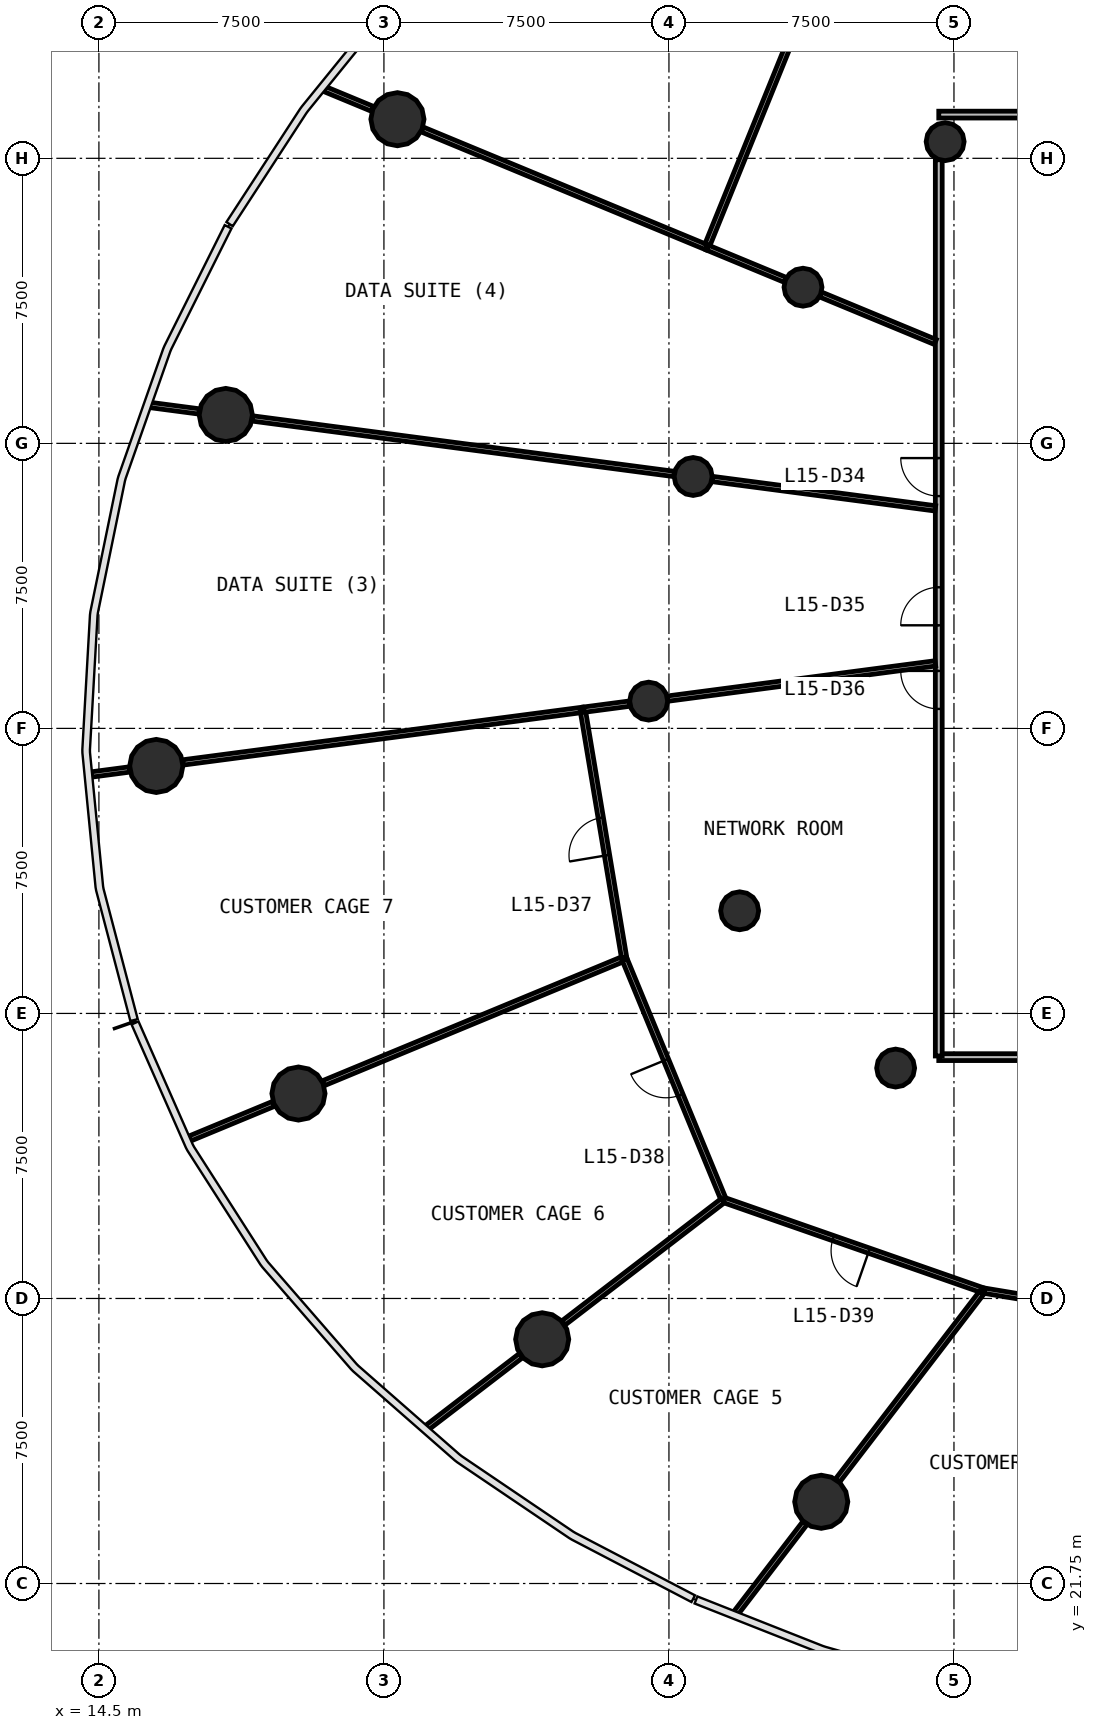
"""IFC4 building model, lengths in metres.
Left out: names, types, materials, properties, quantities, classifications, styles, units other than length and angle.
Written with IfcOpenShell. Run it as: python <this file> out.ifc"""

import sys

from ifc_helpers import new_model, si_unit, direction, frame, frame_2d, origin, origin_2d, place, context, subcontext, project, spatial, rectangle, circle, extrude, source, transform, mapped, element, fill, save


model = new_model("IFC4")
c1 = context("Model", 3, precision=1e-05, world=origin(), true_north=direction((0.0, 1.0)))
c2 = subcontext(c1, "Body", "Model", "MODEL_VIEW")
j1 = project(units=[si_unit("LENGTHUNIT", "METRE"), si_unit("PLANEANGLEUNIT", "RADIAN")], contexts=[c1])
p1 = place(None, origin())
s1 = spatial("IfcSite", under=j1, at=p1, CompositionType="ELEMENT")
p2 = place(p1, origin())
s2 = spatial("IfcBuilding", under=s1, at=p2, CompositionType="ELEMENT")
p3 = place(p2, frame((0.0, 0.0, 66.6)))
s3 = spatial("IfcBuildingStorey", under=s2, at=p3, CompositionType="ELEMENT", Elevation=66.6)
m1 = source(origin(), c2, "Body", "SweptSolid", [
    extrude(circle(Radius=0.7, at=origin_2d()), origin(), (0.0, 0.0, 1.0), 4.4),
])
for number, where, z_axis, x_axis in (
    (1, (22.355, 60.279, 0.0), (0.0, 0.0, 1.0), (1.0, 0.0, 0.0)),
    (2, (17.839, 52.497, 0.0), (0.0, 0.0, 1.0), (1.0, 0.0, 0.0)),
    (3, (16.01, 43.262, 0.0), (0.0, 0.0, 1.0), (1.0, 0.0, 0.0)),
    (4, (19.751, 34.642, 0.0), (0.0, 0.0, 1.0), (1.0, 0.0, 0.0)),
    (5, (26.164, 28.176, 0.0), (0.0, 0.0, 1.0), (1.0, 0.0, 0.0)),
    (6, (33.508, 23.9, 0.0), (0.0, 0.0, 1.0), (1.0, 0.0, 0.0)),
):
    element("IfcColumn", number, at=place(p3, frame(where, z_axis=z_axis, x_axis=x_axis)), inside=s3, PredefinedType="COLUMN", context=c2, shape_type="MappedRepresentation", body=[
        mapped(m1, transform((0.0, 0.0, 0.0), scale=1.0)),
    ])
m2 = source(origin(), c2, "Body", "SweptSolid", [
    extrude(circle(Radius=0.5, at=origin_2d()), origin(), (0.0, 0.0, 1.0), 4.4),
])
for number, where, z_axis, x_axis in (
    (7, (36.768, 59.688, 0.0), (0.0, 0.0, 1.0), (1.0, 0.0, 0.0)),
    (8, (33.028, 55.859, 0.0), (0.0, 0.0, 1.0), (1.0, 0.0, 0.0)),
    (9, (30.137, 50.878, 0.0), (0.0, 0.0, 1.0), (1.0, 0.0, 0.0)),
    (10, (28.966, 44.968, 0.0), (0.0, 0.0, 1.0), (1.0, 0.0, 0.0)),
    (11, (31.361, 39.451, 0.0), (0.0, 0.0, 1.0), (1.0, 0.0, 0.0)),
    (12, (35.465, 35.312, 0.0), (0.0, 0.0, 1.0), (1.0, 0.0, 0.0)),
):
    element("IfcColumn", number, at=place(p3, frame(where, z_axis=z_axis, x_axis=x_axis)), inside=s3, PredefinedType="COLUMN", context=c2, shape_type="MappedRepresentation", body=[
        mapped(m2, transform((0.0, 0.0, 0.0), scale=1.0)),
    ])
p4 = place(p3, frame((67.4, 35.6, 0.0), z_axis=(0.0, 0.0, 1.0), x_axis=(-1.0, 0.0, 0.0)))
e13 = element("IfcWall", 13, at=p4, inside=s3, PredefinedType="PARTITIONING", context=c2, shape_type="SweptSolid", body=[
    extrude(rectangle(XDim=30.8, YDim=0.18, at=frame_2d((15.4, 0.0))), origin(), (0.0, 0.0, 1.0), 3.05),
])
p5 = place(p4, frame((9.05, 0.0, 0.0)))
e14 = element("IfcOpeningElement", 14, at=p5, cuts=e13, PredefinedType="OPENING", context=c2, shape_type="SweptSolid", body=[
    extrude(rectangle(XDim=0.9, YDim=2.1, at=frame_2d((0.45, 1.05))), frame((0.0, 0.1, 0.0), z_axis=(0.0, -1.0, 0.0), x_axis=(1.0, 0.0, 0.0)), (0.0, 0.0, 1.0), 0.2),
])
p6 = place(p4, frame((6.05, 0.0, 0.0)))
e15 = element("IfcOpeningElement", 15, at=p6, cuts=e13, PredefinedType="OPENING", context=c2, shape_type="SweptSolid", body=[
    extrude(rectangle(XDim=0.9, YDim=2.1, at=frame_2d((0.45, 1.05))), frame((0.0, 0.1, 0.0), z_axis=(0.0, -1.0, 0.0), x_axis=(1.0, 0.0, 0.0)), (0.0, 0.0, 1.0), 0.2),
])
p7 = place(p4, frame((2.45, 0.0, 0.0)))
e16 = element("IfcOpeningElement", 16, at=p7, cuts=e13, PredefinedType="OPENING", context=c2, shape_type="SweptSolid", body=[
    extrude(rectangle(XDim=0.9, YDim=2.1, at=frame_2d((0.45, 1.05))), frame((0.0, 0.1, 0.0), z_axis=(0.0, -1.0, 0.0), x_axis=(1.0, 0.0, 0.0)), (0.0, 0.0, 1.0), 0.2),
])
p8 = place(p4, frame((14.95, 0.0, 0.0)))
e17 = element("IfcOpeningElement", 17, at=p8, cuts=e13, PredefinedType="OPENING", context=c2, shape_type="SweptSolid", body=[
    extrude(rectangle(XDim=1.0, YDim=2.1, at=frame_2d((0.5, 1.05))), frame((0.0, 0.1, 0.0), z_axis=(0.0, -1.0, 0.0), x_axis=(1.0, 0.0, 0.0)), (0.0, 0.0, 1.0), 0.2),
])
p9 = place(p3, frame((36.6, 60.4, 0.0), z_axis=(0.0, 0.0, 1.0), x_axis=(1.0, 0.0, 0.0)))
e18 = element("IfcWall", 18, at=p9, inside=s3, PredefinedType="PARTITIONING", context=c2, shape_type="SweptSolid", body=[
    extrude(rectangle(XDim=30.8, YDim=0.18, at=frame_2d((15.4, 0.0))), origin(), (0.0, 0.0, 1.0), 3.05),
])
p10 = place(p9, frame((17.35, 0.0, 0.0)))
e19 = element("IfcOpeningElement", 19, at=p10, cuts=e18, PredefinedType="OPENING", context=c2, shape_type="SweptSolid", body=[
    extrude(rectangle(XDim=1.0, YDim=2.1, at=frame_2d((0.5, 1.05))), frame((0.0, 0.1, 0.0), z_axis=(0.0, -1.0, 0.0), x_axis=(1.0, 0.0, 0.0)), (0.0, 0.0, 1.0), 0.2),
])
p11 = place(p9, frame((14.95, 0.0, 0.0)))
e20 = element("IfcOpeningElement", 20, at=p11, cuts=e18, PredefinedType="OPENING", context=c2, shape_type="SweptSolid", body=[
    extrude(rectangle(XDim=1.0, YDim=2.1, at=frame_2d((0.5, 1.05))), frame((0.0, 0.1, 0.0), z_axis=(0.0, -1.0, 0.0), x_axis=(1.0, 0.0, 0.0)), (0.0, 0.0, 1.0), 0.2),
])
p12 = place(p9, frame((8.95, 0.0, 0.0)))
e21 = element("IfcOpeningElement", 21, at=p12, cuts=e18, PredefinedType="OPENING", context=c2, shape_type="SweptSolid", body=[
    extrude(rectangle(XDim=1.0, YDim=2.1, at=frame_2d((0.5, 1.05))), frame((0.0, 0.1, 0.0), z_axis=(0.0, -1.0, 0.0), x_axis=(1.0, 0.0, 0.0)), (0.0, 0.0, 1.0), 0.2),
])
p13 = place(p3, frame((36.6, 35.63, 0.0), z_axis=(0.0, 0.0, 1.0), x_axis=(0.0, 1.0, 0.0)))
e22 = element("IfcWall", 22, at=p13, inside=s3, PredefinedType="PARTITIONING", context=c2, shape_type="SweptSolid", body=[
    extrude(rectangle(XDim=23.583, YDim=0.18, at=frame_2d((11.791, 0.0))), origin(), (0.0, 0.0, 1.0), 3.05),
])
p14 = place(p13, frame((14.732, 0.0, 0.0)))
e23 = element("IfcOpeningElement", 23, at=p14, cuts=e22, PredefinedType="OPENING", context=c2, shape_type="SweptSolid", body=[
    extrude(rectangle(XDim=1.0, YDim=2.1, at=frame_2d((0.5, 1.05))), frame((0.0, 0.1, 0.0), z_axis=(0.0, -1.0, 0.0), x_axis=(1.0, 0.0, 0.0)), (0.0, 0.0, 1.0), 0.2),
])
p15 = place(p13, frame((11.333, 0.0, 0.0)))
e24 = element("IfcOpeningElement", 24, at=p15, cuts=e22, PredefinedType="OPENING", context=c2, shape_type="SweptSolid", body=[
    extrude(rectangle(XDim=1.0, YDim=2.1, at=frame_2d((0.5, 1.05))), frame((0.0, 0.1, 0.0), z_axis=(0.0, -1.0, 0.0), x_axis=(1.0, 0.0, 0.0)), (0.0, 0.0, 1.0), 0.2),
])
p16 = place(p13, frame((9.133, 0.0, 0.0)))
e25 = element("IfcOpeningElement", 25, at=p16, cuts=e22, PredefinedType="OPENING", context=c2, shape_type="SweptSolid", body=[
    extrude(rectangle(XDim=1.0, YDim=2.1, at=frame_2d((0.5, 1.05))), frame((0.0, 0.1, 0.0), z_axis=(0.0, -1.0, 0.0), x_axis=(1.0, 0.0, 0.0)), (0.0, 0.0, 1.0), 0.2),
])
p17 = place(p3, frame((29.637, 50.944, 0.0), z_axis=(0.0, 0.0, 1.0), x_axis=(-0.991443306772, 0.130538000051, 0.0)))
e26 = element("IfcWall", 26, at=p17, inside=s3, PredefinedType="PARTITIONING", context=c2, shape_type="SweptSolid", body=[
    extrude(rectangle(XDim=11.195, YDim=0.14, at=frame_2d((5.598, 0.0))), origin(), (0.0, 0.0, 1.0), 3.05),
])
p18 = place(p3, frame((27.231, 44.739, 0.0), z_axis=(0.0, 0.0, 1.0), x_axis=(-0.991446699666, -0.130512228242, 0.0)))
e27 = element("IfcWall", 27, at=p18, inside=s3, PredefinedType="PARTITIONING", context=c2, shape_type="SweptSolid", body=[
    extrude(rectangle(XDim=10.614, YDim=0.14, at=frame_2d((5.307, 0.0))), origin(), (0.0, 0.0, 1.0), 3.05),
])
p19 = place(p3, frame((28.324, 38.193, 0.0), z_axis=(0.0, 0.0, 1.0), x_axis=(-0.923883575944, -0.382673670509, 0.0)))
e28 = element("IfcWall", 28, at=p19, inside=s3, PredefinedType="PARTITIONING", context=c2, shape_type="SweptSolid", body=[
    extrude(rectangle(XDim=8.574, YDim=0.14, at=frame_2d((4.287, 0.0))), origin(), (0.0, 0.0, 1.0), 3.05),
])
p20 = place(p3, frame((30.487, 56.911, 0.0), z_axis=(0.0, 0.0, 1.0), x_axis=(-0.923876068888, 0.382691794185, 0.0)))
e29 = element("IfcWall", 29, at=p20, inside=s3, PredefinedType="PARTITIONING", context=c2, shape_type="SweptSolid", body=[
    extrude(rectangle(XDim=8.096, YDim=0.14, at=frame_2d((4.048, 0.0))), origin(), (0.0, 0.0, 1.0), 3.05),
])
p21 = place(p3, frame((37.773, 29.459, 0.0), z_axis=(0.0, 0.0, 1.0), x_axis=(-0.944197740639, 0.329379153215, 0.0)))
e30 = element("IfcWall", 30, at=p21, inside=s3, PredefinedType="PARTITIONING", context=c2, shape_type="SweptSolid", body=[
    extrude(rectangle(XDim=7.234, YDim=0.14, at=frame_2d((3.617, 0.0))), origin(), (0.0, 0.0, 1.0), 3.05),
])
p22 = place(p21, frame((3.184, 0.0, 0.0)))
e31 = element("IfcOpeningElement", 31, at=p22, cuts=e30, PredefinedType="OPENING", context=c2, shape_type="SweptSolid", body=[
    extrude(rectangle(XDim=1.0, YDim=2.1, at=frame_2d((0.5, 1.05))), frame((0.0, 0.08, 0.0), z_axis=(0.0, -1.0, 0.0), x_axis=(1.0, 0.0, 0.0)), (0.0, 0.0, 1.0), 0.16),
])
p23 = place(p3, frame((36.51, 45.961, 0.0), z_axis=(0.0, 0.0, 1.0), x_axis=(-0.99144622305, -0.130515848849, 0.0)))
e32 = element("IfcWall", 32, at=p23, inside=s3, PredefinedType="PARTITIONING", context=c2, shape_type="SweptSolid", body=[
    extrude(rectangle(XDim=7.104, YDim=0.14, at=frame_2d((3.552, 0.0))), origin(), (0.0, 0.0, 1.0), 3.05),
])
p24 = place(p3, frame((30.931, 31.87, 0.0), z_axis=(0.0, 0.0, 1.0), x_axis=(-0.38111222583, 0.924528783393, 0.0)))
e33 = element("IfcWall", 33, at=p24, inside=s3, PredefinedType="PARTITIONING", context=c2, shape_type="SweptSolid", body=[
    extrude(rectangle(XDim=6.81, YDim=0.14, at=frame_2d((3.405, 0.0))), origin(), (0.0, 0.0, 1.0), 3.05),
])
p25 = place(p24, frame((2.96, 0.0, 0.0)))
e34 = element("IfcOpeningElement", 34, at=p25, cuts=e33, PredefinedType="OPENING", context=c2, shape_type="SweptSolid", body=[
    extrude(rectangle(XDim=1.0, YDim=2.1, at=frame_2d((0.5, 1.05))), frame((0.0, 0.08, 0.0), z_axis=(0.0, -1.0, 0.0), x_axis=(1.0, 0.0, 0.0)), (0.0, 0.0, 1.0), 0.16),
])
p26 = place(p3, frame((28.319, 38.223, 0.0), z_axis=(0.0, 0.0, 1.0), x_axis=(-0.164712011009, 0.986341702165, 0.0)))
e35 = element("IfcWall", 35, at=p26, inside=s3, PredefinedType="PARTITIONING", context=c2, shape_type="SweptSolid", body=[
    extrude(rectangle(XDim=6.577, YDim=0.14, at=frame_2d((3.288, 0.0))), origin(), (0.0, 0.0, 1.0), 3.05),
])
p27 = place(p26, frame((2.727, 0.0, 0.0)))
e36 = element("IfcOpeningElement", 36, at=p27, cuts=e35, PredefinedType="OPENING", context=c2, shape_type="SweptSolid", body=[
    extrude(rectangle(XDim=1.0, YDim=2.1, at=frame_2d((0.5, 1.05))), frame((0.0, 0.08, 0.0), z_axis=(0.0, -1.0, 0.0), x_axis=(1.0, 0.0, 0.0)), (0.0, 0.0, 1.0), 0.16),
])
p28 = place(p3, frame((37.728, 29.4, 0.0), z_axis=(0.0, 0.0, 1.0), x_axis=(-0.608768873777, -0.793347627664, 0.0)))
e37 = element("IfcWall", 37, at=p28, inside=s3, PredefinedType="PARTITIONING", context=c2, shape_type="SweptSolid", body=[
    extrude(rectangle(XDim=6.229, YDim=0.14, at=frame_2d((3.114, 0.0))), origin(), (0.0, 0.0, 1.0), 3.05),
])
p29 = place(p3, frame((32.825, 62.677, 0.0), z_axis=(0.0, 0.0, 1.0), x_axis=(-0.375902233723, -0.926659328277, 0.0)))
e38 = element("IfcWall", 38, at=p29, inside=s3, PredefinedType="PARTITIONING", context=c2, shape_type="SweptSolid", body=[
    extrude(rectangle(XDim=6.152, YDim=0.14, at=frame_2d((3.076, 0.0))), origin(), (0.0, 0.0, 1.0), 3.05),
])
p30 = place(p3, frame((43.828, 28.454, 0.0), z_axis=(0.0, 0.0, 1.0), x_axis=(-0.986499590072, 0.163763728546, 0.0)))
e39 = element("IfcWall", 39, at=p30, inside=s3, PredefinedType="PARTITIONING", context=c2, shape_type="SweptSolid", body=[
    extrude(rectangle(XDim=6.108, YDim=0.14, at=frame_2d((3.054, 0.0))), origin(), (0.0, 0.0, 1.0), 3.05),
])
p31 = place(p30, frame((2.458, 0.0, 0.0)))
e40 = element("IfcOpeningElement", 40, at=p31, cuts=e39, PredefinedType="OPENING", context=c2, shape_type="SweptSolid", body=[
    extrude(rectangle(XDim=1.0, YDim=2.1, at=frame_2d((0.5, 1.05))), frame((0.0, 0.08, 0.0), z_axis=(0.0, -1.0, 0.0), x_axis=(1.0, 0.0, 0.0)), (0.0, 0.0, 1.0), 0.16),
])
p32 = place(p3, frame((36.51, 50.039, 0.0), z_axis=(0.0, 0.0, 1.0), x_axis=(-0.991445034615, 0.130524876315, 0.0)))
e41 = element("IfcWall", 41, at=p32, inside=s3, PredefinedType="PARTITIONING", context=c2, shape_type="SweptSolid", body=[
    extrude(rectangle(XDim=5.924, YDim=0.14, at=frame_2d((2.962, 0.0))), origin(), (0.0, 0.0, 1.0), 3.05),
])
p33 = place(p3, frame((30.919, 31.824, 0.0), z_axis=(0.0, 0.0, 1.0), x_axis=(-0.793364806995, -0.608746485018, 0.0)))
e42 = element("IfcWall", 42, at=p33, inside=s3, PredefinedType="PARTITIONING", context=c2, shape_type="SweptSolid", body=[
    extrude(rectangle(XDim=5.288, YDim=0.14, at=frame_2d((2.644, 0.0))), origin(), (0.0, 0.0, 1.0), 3.05),
])
p34 = place(p3, frame((36.51, 54.416, 0.0), z_axis=(0.0, 0.0, 1.0), x_axis=(-0.923911109142, 0.382607190737, 0.0)))
e43 = element("IfcWall", 43, at=p34, inside=s3, PredefinedType="PARTITIONING", context=c2, shape_type="SweptSolid", body=[
    extrude(rectangle(XDim=3.264, YDim=0.14, at=frame_2d((1.632, 0.0))), origin(), (0.0, 0.0, 1.0), 3.05),
])
p35 = place(p3, frame((25.606, 27.747, 0.0), z_axis=(0.0, 0.0, 1.0), x_axis=(-0.793391027205, -0.608712311319, 0.0)))
e44 = element("IfcWall", 44, at=p35, inside=s3, PredefinedType="PARTITIONING", context=c2, shape_type="SweptSolid", body=[
    extrude(rectangle(XDim=3.121, YDim=0.14, at=frame_2d((1.561, 0.0))), origin(), (0.0, 0.0, 1.0), 3.05),
])
p36 = place(p3, frame((33.079, 23.342, 0.0), z_axis=(0.0, 0.0, 1.0), x_axis=(-0.608815186384, -0.793312087912, 0.0)))
e45 = element("IfcWall", 45, at=p36, inside=s3, PredefinedType="PARTITIONING", context=c2, shape_type="SweptSolid", body=[
    extrude(rectangle(XDim=2.979, YDim=0.14, at=frame_2d((1.489, 0.0))), origin(), (0.0, 0.0, 1.0), 3.05),
])
p37 = place(p3, frame((19.1, 34.372, 0.0), z_axis=(0.0, 0.0, 1.0), x_axis=(-0.923877154041, -0.38268917445, 0.0)))
e46 = element("IfcWall", 46, at=p37, inside=s3, PredefinedType="PARTITIONING", context=c2, shape_type="SweptSolid", body=[
    extrude(rectangle(XDim=2.386, YDim=0.14, at=frame_2d((1.193, 0.0))), origin(), (0.0, 0.0, 1.0), 3.05),
])
p38 = place(p3, frame((32.561, 56.052, 0.0), z_axis=(0.0, 0.0, 1.0), x_axis=(-0.923877119512, 0.382689257808, 0.0)))
e47 = element("IfcWall", 47, at=p38, inside=s3, PredefinedType="PARTITIONING", context=c2, shape_type="SweptSolid", body=[
    extrude(rectangle(XDim=2.215, YDim=0.14, at=frame_2d((1.107, 0.0))), origin(), (0.0, 0.0, 1.0), 3.05),
])
p39 = place(p3, frame((21.704, 60.549, 0.0), z_axis=(0.0, 0.0, 1.0), x_axis=(-0.923894797396, 0.382646577594, 0.0)))
e48 = element("IfcWall", 48, at=p39, inside=s3, PredefinedType="PARTITIONING", context=c2, shape_type="SweptSolid", body=[
    extrude(rectangle(XDim=1.365, YDim=0.14, at=frame_2d((0.683, 0.0))), origin(), (0.0, 0.0, 1.0), 3.05),
])
p40 = place(p3, frame((17.141, 52.589, 0.0), z_axis=(0.0, 0.0, 1.0), x_axis=(-0.991446721928, 0.130512059132, 0.0)))
e49 = element("IfcWall", 49, at=p40, inside=s3, PredefinedType="PARTITIONING", context=c2, shape_type="SweptSolid", body=[
    extrude(rectangle(XDim=1.317, YDim=0.14, at=frame_2d((0.658, 0.0))), origin(), (0.0, 0.0, 1.0), 3.05),
])
p41 = place(p3, frame((28.466, 44.902, 0.0), z_axis=(0.0, 0.0, 1.0), x_axis=(-0.99144746031, -0.130506449818, 0.0)))
e50 = element("IfcWall", 50, at=p41, inside=s3, PredefinedType="PARTITIONING", context=c2, shape_type="SweptSolid", body=[
    extrude(rectangle(XDim=1.216, YDim=0.14, at=frame_2d((0.608, 0.0))), origin(), (0.0, 0.0, 1.0), 3.05),
])
p42 = place(p3, frame((15.311, 43.17, 0.0), z_axis=(0.0, 0.0, 1.0), x_axis=(-0.99142596949, -0.130669610165, 0.0)))
e51 = element("IfcWall", 51, at=p42, inside=s3, PredefinedType="PARTITIONING", context=c2, shape_type="SweptSolid", body=[
    extrude(rectangle(XDim=1.028, YDim=0.14, at=frame_2d((0.514, 0.0))), origin(), (0.0, 0.0, 1.0), 3.05),
])
m3 = source(origin(), c2, "Body", "SweptSolid", [
    extrude(rectangle(XDim=1.0, YDim=2.1, at=frame_2d((0.5, 1.05))), frame((0.0, 0.025, 0.0), z_axis=(0.0, -1.0, 0.0), x_axis=(1.0, 0.0, 0.0)), (0.0, 0.0, 1.0), 0.05),
])
p43 = place(p14, origin())
e52 = element("IfcDoor", 52, at=p43, inside=s3, OperationType="SINGLE_SWING_RIGHT", PredefinedType="DOOR", context=c2, shape_type="MappedRepresentation", body=[
    mapped(m3, transform((0.0, 0.0, 0.0), scale=1.0)),
])
fill(e23, e52)
p44 = place(p15, origin())
e53 = element("IfcDoor", 53, at=p44, inside=s3, OperationType="SINGLE_SWING_LEFT", PredefinedType="DOOR", context=c2, shape_type="MappedRepresentation", body=[
    mapped(m3, transform((0.0, 0.0, 0.0), scale=1.0)),
])
fill(e24, e53)
p45 = place(p16, origin())
e54 = element("IfcDoor", 54, at=p45, inside=s3, OperationType="SINGLE_SWING_RIGHT", PredefinedType="DOOR", context=c2, shape_type="MappedRepresentation", body=[
    mapped(m3, transform((0.0, 0.0, 0.0), scale=1.0)),
])
fill(e25, e54)
p46 = place(p27, origin())
e55 = element("IfcDoor", 55, at=p46, inside=s3, OperationType="SINGLE_SWING_LEFT", PredefinedType="DOOR", context=c2, shape_type="MappedRepresentation", body=[
    mapped(m3, transform((0.0, 0.0, 0.0), scale=1.0)),
])
fill(e36, e55)
p47 = place(p25, origin())
e56 = element("IfcDoor", 56, at=p47, inside=s3, OperationType="SINGLE_SWING_RIGHT", PredefinedType="DOOR", context=c2, shape_type="MappedRepresentation", body=[
    mapped(m3, transform((0.0, 0.0, 0.0), scale=1.0)),
])
fill(e34, e56)
p48 = place(p22, origin())
e57 = element("IfcDoor", 57, at=p48, inside=s3, OperationType="SINGLE_SWING_LEFT", PredefinedType="DOOR", context=c2, shape_type="MappedRepresentation", body=[
    mapped(m3, transform((0.0, 0.0, 0.0), scale=1.0)),
])
fill(e31, e57)
save(model, sys.argv[1])
